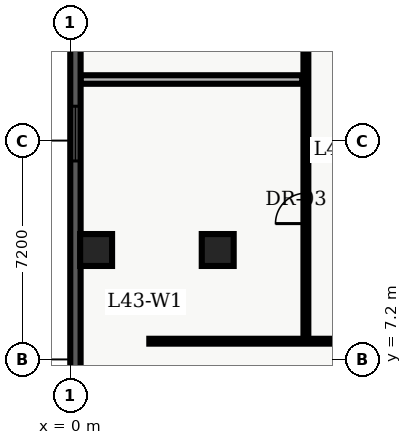
"""IFC4 building model, lengths in metres.
Left out: names, types, materials, properties, quantities, classifications, styles, units other than length and angle.
Written with IfcOpenShell. Run it as: python <this file> out.ifc"""

import sys

from ifc_helpers import new_model, entity, si_unit, converted_unit, direction, frame, origin_with_axes, origin_2d_with_axis, place, context, subcontext, project, spatial, polyline, rectangle, outline, extrude, element, fill, save


model = new_model("IFC4")
c1 = context("Model", 3, precision=1e-05, world=origin_with_axes(), true_north=direction((0.0, 1.0)))
c2 = subcontext(c1, "Body", "Model", "MODEL_VIEW")
j1 = project(units=[si_unit("LENGTHUNIT", "METRE"), converted_unit("PLANEANGLEUNIT", "DEGREE", entity("IfcPlaneAngleMeasure", 0.017), si_unit("PLANEANGLEUNIT", "RADIAN"), dimensions=[0, 0, 0, 0, 0, 0, 0])], contexts=[c1])
p1 = place(None, origin_with_axes())
s1 = spatial("IfcSite", under=j1, at=p1, CompositionType="ELEMENT")
p2 = place(p1, origin_with_axes())
s2 = spatial("IfcBuilding", under=s1, at=p2, CompositionType="ELEMENT")
p3 = place(p2, frame((0.0, 0.0, 175.8), z_axis=(0.0, 0.0, 1.0), x_axis=(1.0, 0.0, 0.0)))
s3 = spatial("IfcBuildingStorey", under=s2, at=p3, CompositionType="ELEMENT", Elevation=175.8)
for number, where, z_axis, x_axis in (
    (1, (4.85, 10.8, 0.0), (0.0, 0.0, 1.0), (1.0, 0.0, 0.0)),
    (2, (0.85, 10.8, 0.0), (0.0, 0.0, 1.0), (1.0, 0.0, 0.0)),
):
    element("IfcColumn", number, at=place(p3, frame(where, z_axis=z_axis, x_axis=x_axis)), inside=s3, PredefinedType="COLUMN", context=c2, shape_type="SweptSolid", body=[
        extrude(rectangle(XDim=1.05, YDim=1.05, at=origin_2d_with_axis()), origin_with_axes(), (0.0, 0.0, 1.0), 3.9),
    ])
p4 = place(p3, frame((2.6, 7.8, 0.0), z_axis=(0.0, 0.0, 1.0), x_axis=(1.0, 0.0, 0.0)))
e3 = element("IfcWall", 3, at=p4, inside=s3, PredefinedType="PARTITIONING", context=c2, shape_type="SweptSolid", body=[
    extrude(outline(polyline([(0.0, -0.08), (18.55, -0.08), (18.55, 0.08), (0.0, 0.08), (0.0, -0.08)])), origin_with_axes(), (0.0, 0.0, 1.0), 2.7),
])
p5 = place(p4, frame((9.245, 0.0, 0.0), z_axis=(0.0, 0.0, 1.0), x_axis=(1.0, 0.0, 0.0)))
e4 = element("IfcOpeningElement", 4, at=p5, cuts=e3, PredefinedType="OPENING", context=c2, shape_type="SweptSolid", body=[
    extrude(rectangle(XDim=1.0, YDim=0.18, at=origin_2d_with_axis()), origin_with_axes(), (0.0, 0.0, 1.0), 2.15),
])
p6 = place(p3, frame((7.75, 7.8, 0.0), z_axis=(0.0, 0.0, 1.0), x_axis=(0.0, 1.0, 0.0)))
e5 = element("IfcWall", 5, at=p6, inside=s3, PredefinedType="PARTITIONING", context=c2, shape_type="SweptSolid", body=[
    extrude(outline(polyline([(0.0, -0.08), (32.7, -0.08), (32.7, 0.08), (0.0, 0.08), (0.0, -0.08)])), origin_with_axes(), (0.0, 0.0, 1.0), 2.7),
])
p7 = place(p6, frame((4.369, 0.0, 0.0), z_axis=(0.0, 0.0, 1.0), x_axis=(1.0, 0.0, 0.0)))
e6 = element("IfcOpeningElement", 6, at=p7, cuts=e5, PredefinedType="OPENING", context=c2, shape_type="SweptSolid", body=[
    extrude(rectangle(XDim=1.0, YDim=0.18, at=origin_2d_with_axis()), origin_with_axes(), (0.0, 0.0, 1.0), 2.15),
])
p8 = place(p6, frame((13.998, 0.0, 0.0), z_axis=(0.0, 0.0, 1.0), x_axis=(1.0, 0.0, 0.0)))
e7 = element("IfcOpeningElement", 7, at=p8, cuts=e5, PredefinedType="OPENING", context=c2, shape_type="SweptSolid", body=[
    extrude(rectangle(XDim=1.0, YDim=0.18, at=origin_2d_with_axis()), origin_with_axes(), (0.0, 0.0, 1.0), 2.15),
])
p9 = place(p6, frame((25.979, 0.0, 0.0), z_axis=(0.0, 0.0, 1.0), x_axis=(1.0, 0.0, 0.0)))
e8 = element("IfcOpeningElement", 8, at=p9, cuts=e5, PredefinedType="OPENING", context=c2, shape_type="SweptSolid", body=[
    extrude(rectangle(XDim=1.0, YDim=0.18, at=origin_2d_with_axis()), origin_with_axes(), (0.0, 0.0, 1.0), 2.15),
])
p10 = place(p3, frame((0.335, 16.408, 0.0), z_axis=(0.0, 0.0, 1.0), x_axis=(1.0, 0.0, 0.0)))
e9 = element("IfcWall", 9, at=p10, inside=s3, PredefinedType="PARTITIONING", context=c2, shape_type="SweptSolid", body=[
    extrude(outline(polyline([(0.0, -0.14), (7.295, -0.14), (7.295, 0.14), (0.0, 0.14), (0.0, -0.14)])), origin_with_axes(), (0.0, 0.0, 1.0), 2.7),
])
p11 = place(p3, frame((0.17, 2.74, 0.0), z_axis=(0.0, 0.0, 1.0), x_axis=(0.0, 1.0, 0.0)))
e10 = element("IfcWall", 10, at=p11, inside=s3, PredefinedType="SOLIDWALL", context=c2, shape_type="SweptSolid", body=[
    extrude(outline(polyline([(0.0, -0.17), (43.46, -0.17), (43.46, 0.17), (0.0, 0.17), (0.0, -0.17)])), origin_with_axes(), (0.0, 0.0, 1.0), 3.66),
])
p12 = place(p11, frame((2.948, 0.0, 0.45), z_axis=(0.0, 0.0, 1.0), x_axis=(1.0, 0.0, 0.0)))
e11 = element("IfcOpeningElement", 11, at=p12, cuts=e10, PredefinedType="OPENING", context=c2, shape_type="SweptSolid", body=[
    extrude(rectangle(XDim=1.8, YDim=0.36, at=origin_2d_with_axis()), origin_with_axes(), (0.0, 0.0, 1.0), 2.1),
])
p13 = place(p11, frame((11.889, 0.0, 0.45), z_axis=(0.0, 0.0, 1.0), x_axis=(1.0, 0.0, 0.0)))
e12 = element("IfcOpeningElement", 12, at=p13, cuts=e10, PredefinedType="OPENING", context=c2, shape_type="SweptSolid", body=[
    extrude(rectangle(XDim=1.8, YDim=0.36, at=origin_2d_with_axis()), origin_with_axes(), (0.0, 0.0, 1.0), 2.1),
])
p14 = place(p11, frame((17.484, 0.0, 0.45), z_axis=(0.0, 0.0, 1.0), x_axis=(1.0, 0.0, 0.0)))
e13 = element("IfcOpeningElement", 13, at=p14, cuts=e10, PredefinedType="OPENING", context=c2, shape_type="SweptSolid", body=[
    extrude(rectangle(XDim=1.8, YDim=0.36, at=origin_2d_with_axis()), origin_with_axes(), (0.0, 0.0, 1.0), 2.1),
])
p15 = place(p11, frame((21.73, 0.0, 0.45), z_axis=(0.0, 0.0, 1.0), x_axis=(1.0, 0.0, 0.0)))
e14 = element("IfcOpeningElement", 14, at=p15, cuts=e10, PredefinedType="OPENING", context=c2, shape_type="SweptSolid", body=[
    extrude(rectangle(XDim=1.8, YDim=0.36, at=origin_2d_with_axis()), origin_with_axes(), (0.0, 0.0, 1.0), 2.1),
])
p16 = place(p11, frame((26.426, 0.0, 0.45), z_axis=(0.0, 0.0, 1.0), x_axis=(1.0, 0.0, 0.0)))
e15 = element("IfcOpeningElement", 15, at=p16, cuts=e10, PredefinedType="OPENING", context=c2, shape_type="SweptSolid", body=[
    extrude(rectangle(XDim=1.8, YDim=0.36, at=origin_2d_with_axis()), origin_with_axes(), (0.0, 0.0, 1.0), 2.1),
])
p17 = place(p11, frame((31.121, 0.0, 0.45), z_axis=(0.0, 0.0, 1.0), x_axis=(1.0, 0.0, 0.0)))
e16 = element("IfcOpeningElement", 16, at=p17, cuts=e10, PredefinedType="OPENING", context=c2, shape_type="SweptSolid", body=[
    extrude(rectangle(XDim=1.8, YDim=0.36, at=origin_2d_with_axis()), origin_with_axes(), (0.0, 0.0, 1.0), 2.1),
])
p18 = place(p11, frame((40.062, 0.0, 0.45), z_axis=(0.0, 0.0, 1.0), x_axis=(1.0, 0.0, 0.0)))
e17 = element("IfcOpeningElement", 17, at=p18, cuts=e10, PredefinedType="OPENING", context=c2, shape_type="SweptSolid", body=[
    extrude(rectangle(XDim=1.8, YDim=0.36, at=origin_2d_with_axis()), origin_with_axes(), (0.0, 0.0, 1.0), 2.1),
])
p19 = place(p6, frame((4.369, 0.0, 0.0), z_axis=(0.0, 0.0, 1.0), x_axis=(1.0, 0.0, 0.0)))
e18 = element("IfcDoor", 18, at=p19, inside=s3, OperationType="SINGLE_SWING_LEFT", PredefinedType="DOOR", context=c2, shape_type="SweptSolid", body=[
    extrude(rectangle(XDim=1.0, YDim=0.09, at=origin_2d_with_axis()), origin_with_axes(), (0.0, 0.0, 1.0), 2.15),
])
fill(e6, e18)
p20 = place(p11, frame((11.889, 0.0, 0.45), z_axis=(0.0, 0.0, 1.0), x_axis=(1.0, 0.0, 0.0)))
e19 = element("IfcWindow", 19, at=p20, inside=s3, PredefinedType="WINDOW", context=c2, shape_type="SweptSolid", body=[
    extrude(rectangle(XDim=1.8, YDim=0.09, at=origin_2d_with_axis()), origin_with_axes(), (0.0, 0.0, 1.0), 2.1),
])
fill(e12, e19)
save(model, sys.argv[1])
